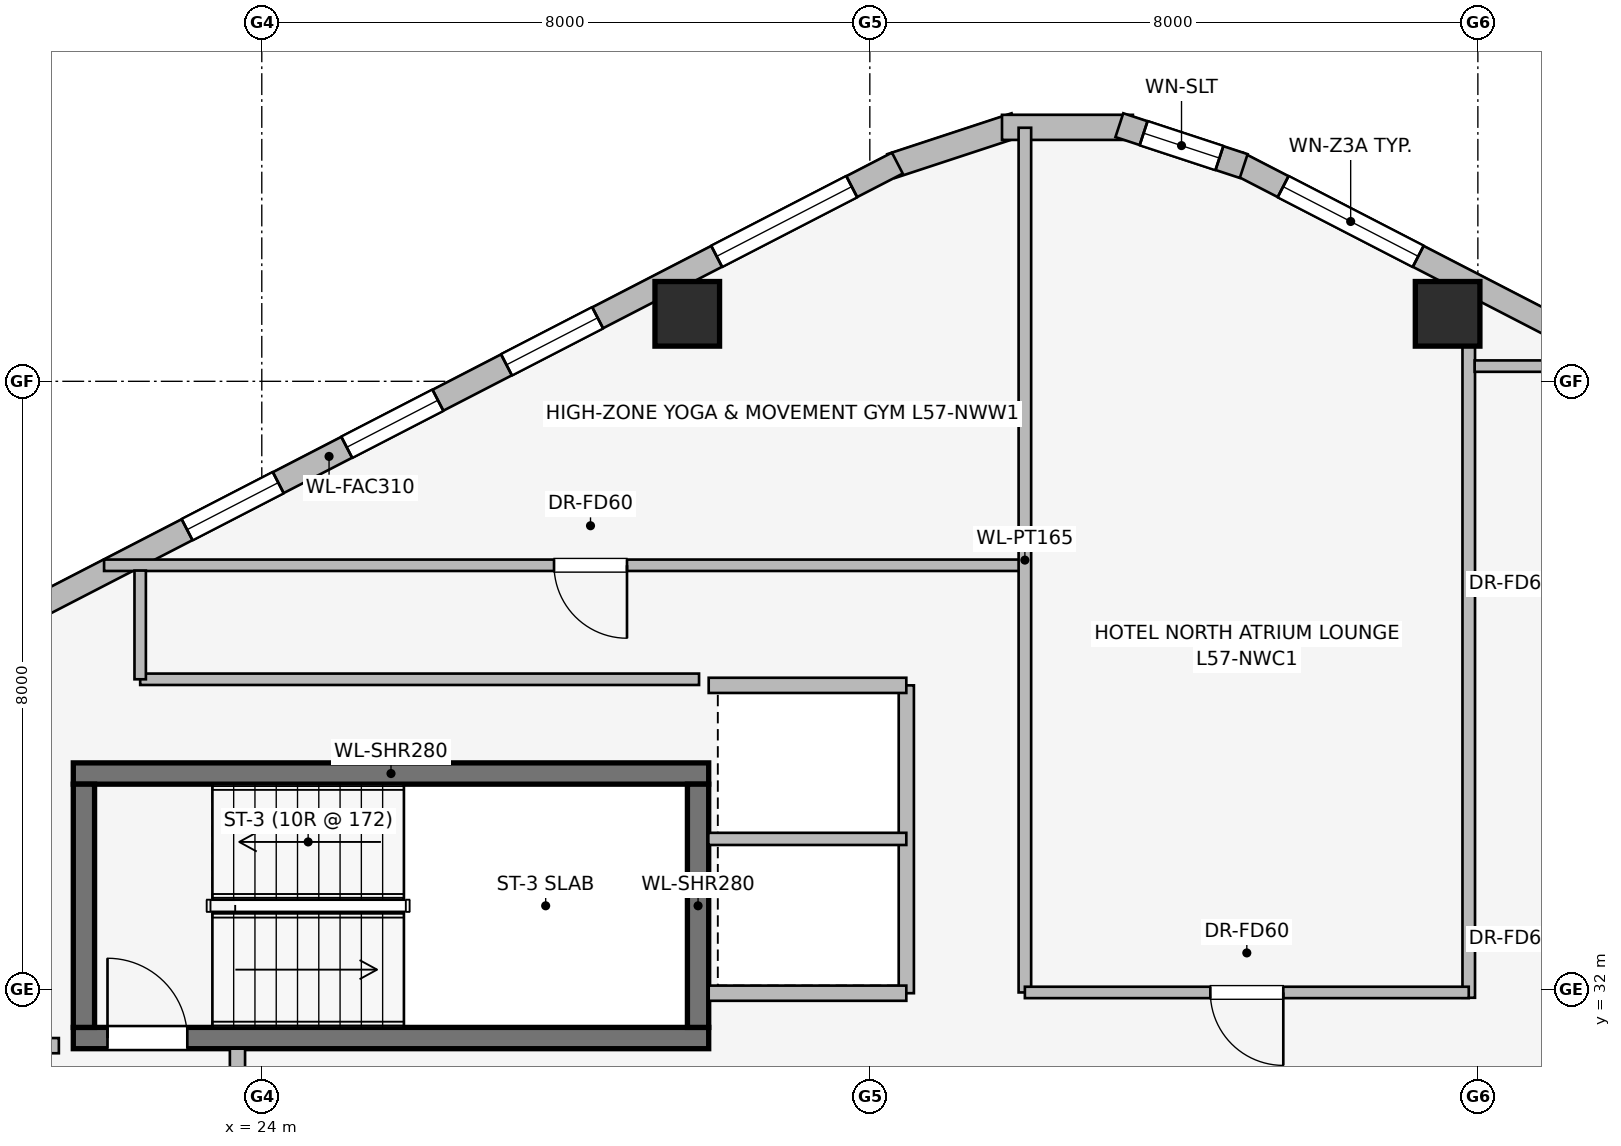
"""IFC4 building model, lengths in metres.
Left out: names, types, materials, properties, quantities, classifications, styles, units other than length and angle.
Written with IfcOpenShell. Run it as: python <this file> out.ifc"""

import sys

from ifc_helpers import new_model, si_unit, direction, frame, frame_2d, origin, origin_2d, place, context, subcontext, project, spatial, rectangle, extrude, element, fill, save


model = new_model("IFC4")
c1 = context("Model", 3, precision=1e-05, world=origin(), true_north=direction((0.0, 1.0)))
c2 = subcontext(c1, "Body", "Model", "MODEL_VIEW")
j1 = project(units=[si_unit("LENGTHUNIT", "METRE"), si_unit("PLANEANGLEUNIT", "RADIAN")], contexts=[c1])
p1 = place(None, origin())
s1 = spatial("IfcSite", under=j1, at=p1, CompositionType="ELEMENT")
p2 = place(p1, origin())
s2 = spatial("IfcBuilding", under=s1, at=p2, CompositionType="ELEMENT")
p3 = place(p2, frame((0.0, 0.0, 210.25)))
s3 = spatial("IfcBuildingStorey", under=s2, at=p3, CompositionType="ELEMENT", Elevation=210.25)
p4 = place(p3, frame((21.52, 31.36, 0.0), z_axis=(0.0, 0.0, 1.0), x_axis=(1.0, 0.0, 0.0)))
e1 = element("IfcWall", 1, at=p4, inside=s3, PredefinedType="SHEAR", context=c2, shape_type="SweptSolid", body=[
    extrude(rectangle(XDim=8.36, YDim=0.28, at=frame_2d((4.18, 0.0))), origin(), (0.0, 0.0, 1.0), 3.45),
])
p5 = place(p4, frame((0.45, 0.0, 0.0)))
e2 = element("IfcOpeningElement", 2, at=p5, cuts=e1, PredefinedType="OPENING", context=c2, shape_type="SweptSolid", body=[
    extrude(rectangle(XDim=1.05, YDim=2.0, at=frame_2d((0.525, 1.0))), frame((0.0, 0.15, 0.0), z_axis=(0.0, -1.0, 0.0), x_axis=(1.0, 0.0, 0.0)), (0.0, 0.0, 1.0), 0.3),
])
p6 = place(p3, frame((29.88, 34.84, 0.0), z_axis=(0.0, 0.0, 1.0), x_axis=(-1.0, 0.0, 0.0)))
e3 = element("IfcWall", 3, at=p6, inside=s3, PredefinedType="SHEAR", context=c2, shape_type="SweptSolid", body=[
    extrude(rectangle(XDim=8.36, YDim=0.28, at=frame_2d((4.18, 0.0))), origin(), (0.0, 0.0, 1.0), 3.45),
])
for number, where, z_axis, x_axis in (
    (4, (21.66, 34.7, 0.0), (0.0, 0.0, 1.0), (0.0, -1.0, 0.0)),
    (5, (29.74, 31.5, 0.0), (0.0, 0.0, 1.0), (0.0, 1.0, 0.0)),
):
    element("IfcWall", number, at=place(p3, frame(where, z_axis=z_axis, x_axis=x_axis)), inside=s3, PredefinedType="SHEAR", context=c2, shape_type="SweptSolid", body=[
        extrude(rectangle(XDim=3.2, YDim=0.28, at=frame_2d((1.6, 0.0))), origin(), (0.0, 0.0, 1.0), 3.45),
    ])
for number, where, z_axis, x_axis in (
    (6, (39.602, 40.888, 0.0), (0.0, 0.0, 1.0), (1.0, 0.0, 0.0)),
    (7, (29.598, 40.888, 0.0), (0.0, 0.0, 1.0), (1.0, 0.0, 0.0)),
):
    element("IfcColumn", number, at=place(p3, frame(where, z_axis=z_axis, x_axis=x_axis)), inside=s3, PredefinedType="COLUMN", context=c2, shape_type="SweptSolid", body=[
        extrude(rectangle(XDim=0.85, YDim=0.85, at=origin_2d()), origin(), (0.0, 0.0, 1.0), 3.45),
    ])
p7 = place(p3, frame((36.838, 42.871, 0.0), z_axis=(0.0, 0.0, 1.0), x_axis=(0.888626188278, -0.458632202867, 0.0)))
e8 = element("IfcWall", 8, at=p7, inside=s3, PredefinedType="STANDARD", context=c2, shape_type="SweptSolid", body=[
    extrude(rectangle(XDim=16.828, YDim=0.31, at=frame_2d((8.414, 0.0))), origin(), (0.0, 0.0, 1.0), 3.19),
])
p8 = place(p7, frame((0.675, 0.0, 0.75)))
e9 = element("IfcOpeningElement", 9, at=p8, cuts=e8, PredefinedType="OPENING", context=c2, shape_type="SweptSolid", body=[
    extrude(rectangle(XDim=2.0, YDim=1.5, at=frame_2d((1.0, 0.75))), frame((0.0, 0.165, 0.0), z_axis=(0.0, -1.0, 0.0), x_axis=(1.0, 0.0, 0.0)), (0.0, 0.0, 1.0), 0.33),
])
p9 = place(p7, frame((6.369, 0.0, 0.75)))
e10 = element("IfcOpeningElement", 10, at=p9, cuts=e8, PredefinedType="OPENING", context=c2, shape_type="SweptSolid", body=[
    extrude(rectangle(XDim=1.35, YDim=1.45, at=frame_2d((0.675, 0.725))), frame((0.0, 0.165, 0.0), z_axis=(0.0, -1.0, 0.0), x_axis=(1.0, 0.0, 0.0)), (0.0, 0.0, 1.0), 0.33),
])
p10 = place(p7, frame((8.71, 0.0, 0.75)))
e11 = element("IfcOpeningElement", 11, at=p10, cuts=e8, PredefinedType="OPENING", context=c2, shape_type="SweptSolid", body=[
    extrude(rectangle(XDim=1.35, YDim=1.45, at=frame_2d((0.675, 0.725))), frame((0.0, 0.165, 0.0), z_axis=(0.0, -1.0, 0.0), x_axis=(1.0, 0.0, 0.0)), (0.0, 0.0, 1.0), 0.33),
])
p11 = place(p7, frame((11.052, 0.0, 0.75)))
e12 = element("IfcOpeningElement", 12, at=p11, cuts=e8, PredefinedType="OPENING", context=c2, shape_type="SweptSolid", body=[
    extrude(rectangle(XDim=1.35, YDim=1.45, at=frame_2d((0.675, 0.725))), frame((0.0, 0.165, 0.0), z_axis=(0.0, -1.0, 0.0), x_axis=(1.0, 0.0, 0.0)), (0.0, 0.0, 1.0), 0.33),
])
p12 = place(p7, frame((14.153, 0.0, 0.75)))
e13 = element("IfcOpeningElement", 13, at=p12, cuts=e8, PredefinedType="OPENING", context=c2, shape_type="SweptSolid", body=[
    extrude(rectangle(XDim=2.0, YDim=1.5, at=frame_2d((1.0, 0.75))), frame((0.0, 0.165, 0.0), z_axis=(0.0, -1.0, 0.0), x_axis=(1.0, 0.0, 0.0)), (0.0, 0.0, 1.0), 0.33),
])
p13 = place(p3, frame((32.281, 42.832, 0.0), z_axis=(0.0, 0.0, 1.0), x_axis=(0.949937416267, 0.312440242569, 0.0)))
e14 = element("IfcWall", 14, at=p13, inside=s3, PredefinedType="STANDARD", context=c2, shape_type="SweptSolid", body=[
    extrude(rectangle(XDim=1.722, YDim=0.33, at=frame_2d((0.861, 0.0))), origin(), (0.0, 0.0, 1.0), 3.19),
])
p14 = place(p3, frame((33.739, 43.341, 0.0), z_axis=(0.0, 0.0, 1.0), x_axis=(1.0, 0.0, 0.0)))
e15 = element("IfcWall", 15, at=p14, inside=s3, PredefinedType="STANDARD", context=c2, shape_type="SweptSolid", body=[
    extrude(rectangle(XDim=1.722, YDim=0.33, at=frame_2d((0.861, 0.0))), origin(), (0.0, 0.0, 1.0), 3.19),
])
p15 = place(p3, frame((35.283, 43.37, 0.0), z_axis=(0.0, 0.0, 1.0), x_axis=(0.949937416267, -0.312440242569, 0.0)))
e16 = element("IfcWall", 16, at=p15, inside=s3, PredefinedType="STANDARD", context=c2, shape_type="SweptSolid", body=[
    extrude(rectangle(XDim=1.722, YDim=0.33, at=frame_2d((0.861, 0.0))), origin(), (0.0, 0.0, 1.0), 3.19),
])
p16 = place(p15, frame((0.336, 0.0, 0.75)))
e17 = element("IfcOpeningElement", 17, at=p16, cuts=e16, PredefinedType="OPENING", context=c2, shape_type="SweptSolid", body=[
    extrude(rectangle(XDim=1.05, YDim=1.4, at=frame_2d((0.525, 0.7))), frame((0.0, 0.175, 0.0), z_axis=(0.0, -1.0, 0.0), x_axis=(1.0, 0.0, 0.0)), (0.0, 0.0, 1.0), 0.35),
])
p17 = place(p3, frame((17.408, 35.153, 0.0), z_axis=(0.0, 0.0, 1.0), x_axis=(0.888626188278, 0.458632202867, 0.0)))
e18 = element("IfcWall", 18, at=p17, inside=s3, PredefinedType="STANDARD", context=c2, shape_type="SweptSolid", body=[
    extrude(rectangle(XDim=16.828, YDim=0.31, at=frame_2d((8.414, 0.0))), origin(), (0.0, 0.0, 1.0), 3.19),
])
p18 = place(p17, frame((0.675, 0.0, 0.75)))
e19 = element("IfcOpeningElement", 19, at=p18, cuts=e18, PredefinedType="OPENING", context=c2, shape_type="SweptSolid", body=[
    extrude(rectangle(XDim=2.0, YDim=1.5, at=frame_2d((1.0, 0.75))), frame((0.0, 0.165, 0.0), z_axis=(0.0, -1.0, 0.0), x_axis=(1.0, 0.0, 0.0)), (0.0, 0.0, 1.0), 0.33),
])
p19 = place(p17, frame((6.312, 0.0, 0.75)))
e20 = element("IfcOpeningElement", 20, at=p19, cuts=e18, PredefinedType="OPENING", context=c2, shape_type="SweptSolid", body=[
    extrude(rectangle(XDim=1.35, YDim=1.45, at=frame_2d((0.675, 0.725))), frame((0.0, 0.165, 0.0), z_axis=(0.0, -1.0, 0.0), x_axis=(1.0, 0.0, 0.0)), (0.0, 0.0, 1.0), 0.33),
])
p20 = place(p17, frame((8.676, 0.0, 0.75)))
e21 = element("IfcOpeningElement", 21, at=p20, cuts=e18, PredefinedType="OPENING", context=c2, shape_type="SweptSolid", body=[
    extrude(rectangle(XDim=1.35, YDim=1.45, at=frame_2d((0.675, 0.725))), frame((0.0, 0.165, 0.0), z_axis=(0.0, -1.0, 0.0), x_axis=(1.0, 0.0, 0.0)), (0.0, 0.0, 1.0), 0.33),
])
p21 = place(p17, frame((11.041, 0.0, 0.75)))
e22 = element("IfcOpeningElement", 22, at=p21, cuts=e18, PredefinedType="OPENING", context=c2, shape_type="SweptSolid", body=[
    extrude(rectangle(XDim=1.35, YDim=1.45, at=frame_2d((0.675, 0.725))), frame((0.0, 0.165, 0.0), z_axis=(0.0, -1.0, 0.0), x_axis=(1.0, 0.0, 0.0)), (0.0, 0.0, 1.0), 0.33),
])
p22 = place(p17, frame((14.153, 0.0, 0.75)))
e23 = element("IfcOpeningElement", 23, at=p22, cuts=e18, PredefinedType="OPENING", context=c2, shape_type="SweptSolid", body=[
    extrude(rectangle(XDim=2.0, YDim=1.5, at=frame_2d((1.0, 0.75))), frame((0.0, 0.165, 0.0), z_axis=(0.0, -1.0, 0.0), x_axis=(1.0, 0.0, 0.0)), (0.0, 0.0, 1.0), 0.33),
])
p23 = place(p3, frame((23.68, 25.68, 0.0), z_axis=(0.0, 0.0, 1.0), x_axis=(0.0, 1.0, 0.0)))
e24 = element("IfcWall", 24, at=p23, inside=s3, PredefinedType="PARTITIONING", context=c2, shape_type="SweptSolid", body=[
    extrude(rectangle(XDim=5.54, YDim=0.2, at=frame_2d((2.77, 0.0))), origin(), (0.0, 0.0, 1.0), 3.19),
])
p24 = place(p23, frame((1.8, 0.0, 0.0)))
e25 = element("IfcOpeningElement", 25, at=p24, cuts=e24, PredefinedType="OPENING", context=c2, shape_type="SweptSolid", body=[
    extrude(rectangle(XDim=1.05, YDim=2.0, at=frame_2d((0.525, 1.0))), frame((0.0, 0.11, 0.0), z_axis=(0.0, -1.0, 0.0), x_axis=(1.0, 0.0, 0.0)), (0.0, 0.0, 1.0), 0.22),
])
p25 = place(p3, frame((21.33, 31.26, 0.0), z_axis=(0.0, 0.0, 1.0), x_axis=(-1.0, 0.0, 0.0)))
e26 = element("IfcWall", 26, at=p25, inside=s3, PredefinedType="PARTITIONING", context=c2, shape_type="SweptSolid", body=[
    extrude(rectangle(XDim=1.68, YDim=0.2, at=frame_2d((0.84, 0.0))), origin(), (0.0, 0.0, 1.0), 3.19),
])
p26 = place(p3, frame((32.48, 31.95, 0.0), z_axis=(0.0, 0.0, 1.0), x_axis=(0.0, 1.0, 0.0)))
e27 = element("IfcWall", 27, at=p26, inside=s3, PredefinedType="PARTITIONING", context=c2, shape_type="SweptSolid", body=[
    extrude(rectangle(XDim=4.05, YDim=0.2, at=frame_2d((2.025, 0.0))), origin(), (0.0, 0.0, 1.0), 3.19),
])
for number, where, z_axis, x_axis in (
    (28, (29.88, 36.0, 0.0), (0.0, 0.0, 1.0), (1.0, 0.0, 0.0)),
    (29, (32.48, 31.95, 0.0), (0.0, 0.0, 1.0), (-1.0, 0.0, 0.0)),
):
    element("IfcWall", number, at=place(p3, frame(where, z_axis=z_axis, x_axis=x_axis)), inside=s3, PredefinedType="PARTITIONING", context=c2, shape_type="SweptSolid", body=[
        extrude(rectangle(XDim=2.6, YDim=0.2, at=frame_2d((1.3, 0.0))), origin(), (0.0, 0.0, 1.0), 3.19),
    ])
p27 = place(p3, frame((29.875, 33.98, 0.0), z_axis=(0.0, 0.0, 1.0), x_axis=(1.0, 0.0, 0.0)))
e30 = element("IfcWall", 30, at=p27, inside=s3, PredefinedType="PARTITIONING", context=c2, shape_type="SweptSolid", body=[
    extrude(rectangle(XDim=2.605, YDim=0.16, at=frame_2d((1.302, 0.0))), origin(), (0.0, 0.0, 1.0), 2.582),
])
p28 = place(p3, frame((34.0, 37.58, 0.0), z_axis=(0.0, 0.0, 1.0), x_axis=(-1.0, 0.0, 0.0)))
e31 = element("IfcWall", 31, at=p28, inside=s3, PredefinedType="PARTITIONING", context=c2, shape_type="SweptSolid", body=[
    extrude(rectangle(XDim=12.075, YDim=0.15, at=frame_2d((6.038, 0.0))), origin(), (0.0, 0.0, 1.0), 2.582),
])
p29 = place(p28, frame((5.195, 0.0, 0.0)))
e32 = element("IfcOpeningElement", 32, at=p29, cuts=e31, PredefinedType="OPENING", context=c2, shape_type="SweptSolid", body=[
    extrude(rectangle(XDim=0.96, YDim=2.0, at=frame_2d((0.48, 1.0))), frame((0.0, 0.085, 0.0), z_axis=(0.0, -1.0, 0.0), x_axis=(1.0, 0.0, 0.0)), (0.0, 0.0, 1.0), 0.17),
])
p30 = place(p3, frame((34.04, 31.96, 0.0), z_axis=(0.0, 0.0, 1.0), x_axis=(0.0, 1.0, 0.0)))
e33 = element("IfcWall", 33, at=p30, inside=s3, PredefinedType="PARTITIONING", context=c2, shape_type="SweptSolid", body=[
    extrude(rectangle(XDim=11.376, YDim=0.165, at=frame_2d((5.688, 0.0))), origin(), (0.0, 0.0, 1.0), 3.19),
])
p31 = place(p3, frame((39.88, 31.89, 0.0), z_axis=(0.0, 0.0, 1.0), x_axis=(0.0, 1.0, 0.0)))
e34 = element("IfcWall", 34, at=p31, inside=s3, PredefinedType="PARTITIONING", context=c2, shape_type="SweptSolid", body=[
    extrude(rectangle(XDim=9.406, YDim=0.165, at=frame_2d((4.703, 0.0))), origin(), (0.0, 0.0, 1.0), 2.497),
])
p32 = place(p3, frame((39.88, 31.96, 0.0), z_axis=(0.0, 0.0, 1.0), x_axis=(-1.0, 0.0, 0.0)))
e35 = element("IfcWall", 35, at=p32, inside=s3, PredefinedType="PARTITIONING", context=c2, shape_type="SweptSolid", body=[
    extrude(rectangle(XDim=5.84, YDim=0.15, at=frame_2d((2.92, 0.0))), origin(), (0.0, 0.0, 1.0), 3.19),
])
p33 = place(p32, frame((2.44, 0.0, 0.0)))
e36 = element("IfcOpeningElement", 36, at=p33, cuts=e35, PredefinedType="OPENING", context=c2, shape_type="SweptSolid", body=[
    extrude(rectangle(XDim=0.96, YDim=2.0, at=frame_2d((0.48, 1.0))), frame((0.0, 0.085, 0.0), z_axis=(0.0, -1.0, 0.0), x_axis=(1.0, 0.0, 0.0)), (0.0, 0.0, 1.0), 0.17),
])
p34 = place(p3, frame((29.753, 36.08, 0.0), z_axis=(0.0, 0.0, 1.0), x_axis=(-1.0, 0.0, 0.0)))
e37 = element("IfcWall", 37, at=p34, inside=s3, PredefinedType="PARTITIONING", context=c2, shape_type="SweptSolid", body=[
    extrude(rectangle(XDim=7.353, YDim=0.15, at=frame_2d((3.677, 0.0))), origin(), (0.0, 0.0, 1.0), 3.19),
])
p35 = place(p3, frame((22.4, 36.08, 0.0), z_axis=(0.0, 0.0, 1.0), x_axis=(0.0, 1.0, 0.0)))
e38 = element("IfcWall", 38, at=p35, inside=s3, PredefinedType="PARTITIONING", context=c2, shape_type="SweptSolid", body=[
    extrude(rectangle(XDim=1.43, YDim=0.15, at=frame_2d((0.715, 0.0))), origin(), (0.0, 0.0, 1.0), 3.19),
])
p36 = place(p3, frame((39.958, 40.2, 0.0), z_axis=(0.0, 0.0, 1.0), x_axis=(1.0, 0.0, 0.0)))
e39 = element("IfcWall", 39, at=p36, inside=s3, PredefinedType="PARTITIONING", context=c2, shape_type="SweptSolid", body=[
    extrude(rectangle(XDim=1.512, YDim=0.15, at=frame_2d((0.756, 0.0))), origin(), (0.0, 0.0, 1.0), 3.19),
])
p37 = place(p8, origin())
e40 = element("IfcWindow", 40, at=p37, inside=s3, PartitioningType="SINGLE_PANEL", PredefinedType="WINDOW", context=c2, shape_type="SweptSolid", body=[
    extrude(rectangle(XDim=2.0, YDim=1.5, at=frame_2d((1.0, 0.75))), frame((0.0, 0.03, 0.0), z_axis=(0.0, -1.0, 0.0), x_axis=(1.0, 0.0, 0.0)), (0.0, 0.0, 1.0), 0.06),
])
fill(e9, e40)
p38 = place(p16, origin())
e41 = element("IfcWindow", 41, at=p38, inside=s3, PartitioningType="SINGLE_PANEL", PredefinedType="WINDOW", context=c2, shape_type="SweptSolid", body=[
    extrude(rectangle(XDim=1.05, YDim=1.4, at=frame_2d((0.525, 0.7))), frame((0.0, 0.03, 0.0), z_axis=(0.0, -1.0, 0.0), x_axis=(1.0, 0.0, 0.0)), (0.0, 0.0, 1.0), 0.06),
])
fill(e17, e41)
p39 = place(p19, origin())
e42 = element("IfcWindow", 42, at=p39, inside=s3, PartitioningType="SINGLE_PANEL", PredefinedType="WINDOW", context=c2, shape_type="SweptSolid", body=[
    extrude(rectangle(XDim=1.35, YDim=1.45, at=frame_2d((0.675, 0.725))), frame((0.0, 0.03, 0.0), z_axis=(0.0, -1.0, 0.0), x_axis=(1.0, 0.0, 0.0)), (0.0, 0.0, 1.0), 0.06),
])
fill(e20, e42)
p40 = place(p20, origin())
e43 = element("IfcWindow", 43, at=p40, inside=s3, PartitioningType="SINGLE_PANEL", PredefinedType="WINDOW", context=c2, shape_type="SweptSolid", body=[
    extrude(rectangle(XDim=1.35, YDim=1.45, at=frame_2d((0.675, 0.725))), frame((0.0, 0.03, 0.0), z_axis=(0.0, -1.0, 0.0), x_axis=(1.0, 0.0, 0.0)), (0.0, 0.0, 1.0), 0.06),
])
fill(e21, e43)
p41 = place(p21, origin())
e44 = element("IfcWindow", 44, at=p41, inside=s3, PartitioningType="SINGLE_PANEL", PredefinedType="WINDOW", context=c2, shape_type="SweptSolid", body=[
    extrude(rectangle(XDim=1.35, YDim=1.45, at=frame_2d((0.675, 0.725))), frame((0.0, 0.03, 0.0), z_axis=(0.0, -1.0, 0.0), x_axis=(1.0, 0.0, 0.0)), (0.0, 0.0, 1.0), 0.06),
])
fill(e22, e44)
p42 = place(p22, origin())
e45 = element("IfcWindow", 45, at=p42, inside=s3, PartitioningType="SINGLE_PANEL", PredefinedType="WINDOW", context=c2, shape_type="SweptSolid", body=[
    extrude(rectangle(XDim=2.0, YDim=1.5, at=frame_2d((1.0, 0.75))), frame((0.0, 0.03, 0.0), z_axis=(0.0, -1.0, 0.0), x_axis=(1.0, 0.0, 0.0)), (0.0, 0.0, 1.0), 0.06),
])
fill(e23, e45)
p43 = place(p5, origin())
e46 = element("IfcDoor", 46, at=p43, inside=s3, OperationType="SINGLE_SWING_LEFT", PredefinedType="DOOR", context=c2, shape_type="SweptSolid", body=[
    extrude(rectangle(XDim=1.05, YDim=2.0, at=frame_2d((0.525, 1.0))), frame((0.0, 0.025, 0.0), z_axis=(0.0, -1.0, 0.0), x_axis=(1.0, 0.0, 0.0)), (0.0, 0.0, 1.0), 0.05),
])
fill(e2, e46)
p44 = place(p29, origin())
e47 = element("IfcDoor", 47, at=p44, inside=s3, OperationType="SINGLE_SWING_LEFT", PredefinedType="DOOR", context=c2, shape_type="SweptSolid", body=[
    extrude(rectangle(XDim=0.96, YDim=2.0, at=frame_2d((0.48, 1.0))), frame((0.0, 0.025, 0.0), z_axis=(0.0, -1.0, 0.0), x_axis=(1.0, 0.0, 0.0)), (0.0, 0.0, 1.0), 0.05),
])
fill(e32, e47)
p45 = place(p33, origin())
e48 = element("IfcDoor", 48, at=p45, inside=s3, OperationType="SINGLE_SWING_LEFT", PredefinedType="DOOR", context=c2, shape_type="SweptSolid", body=[
    extrude(rectangle(XDim=0.96, YDim=2.0, at=frame_2d((0.48, 1.0))), frame((0.0, 0.025, 0.0), z_axis=(0.0, -1.0, 0.0), x_axis=(1.0, 0.0, 0.0)), (0.0, 0.0, 1.0), 0.05),
])
fill(e36, e48)
save(model, sys.argv[1])
